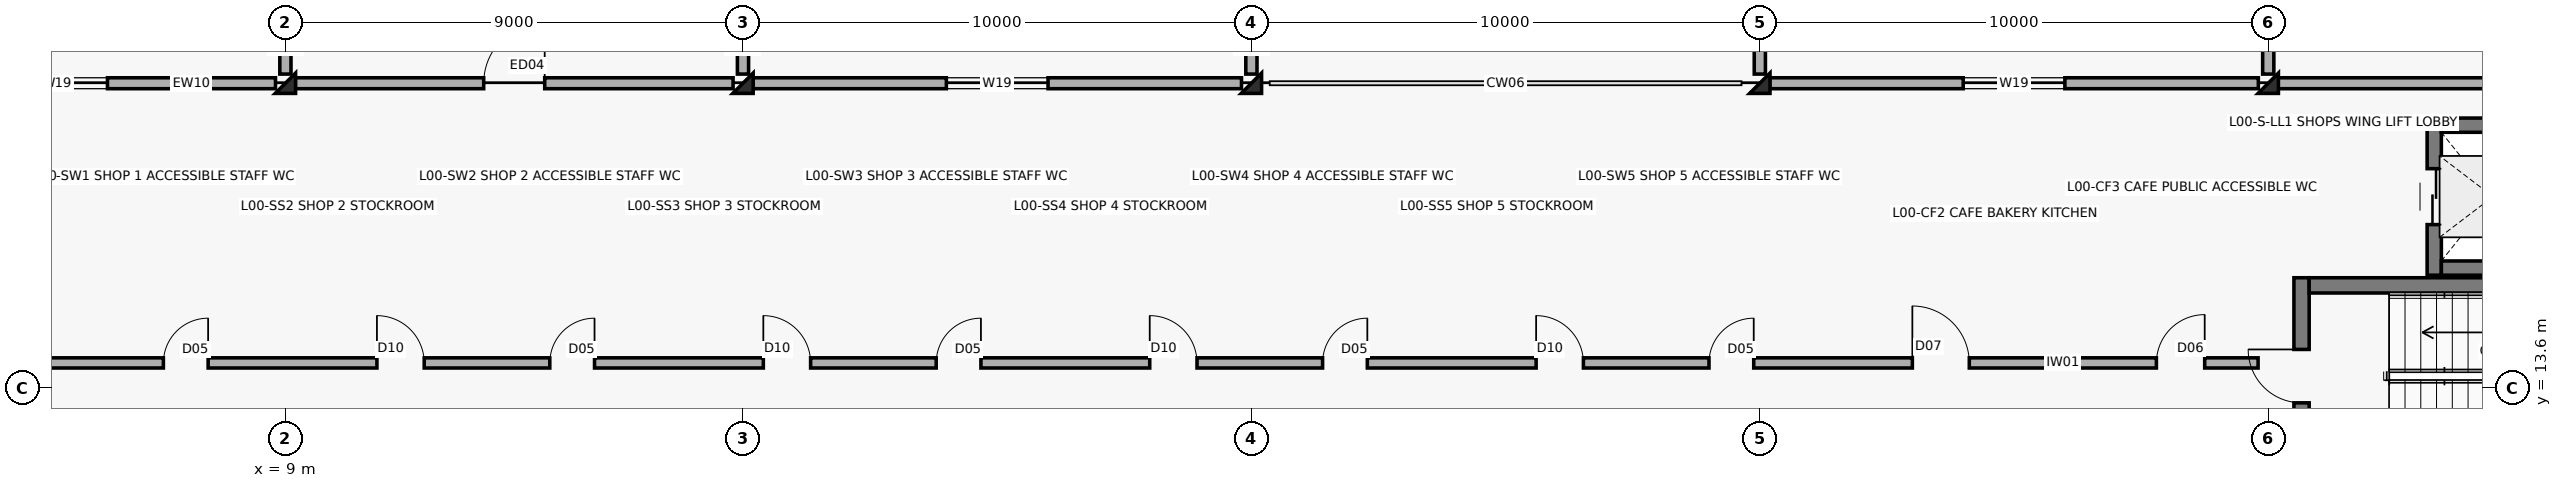
"""IFC4 building model, lengths in metres.
Left out: names, types, materials, properties, quantities, classifications, styles, units other than length and angle.
Written with IfcOpenShell. Run it as: python <this file> out.ifc"""

import sys

from ifc_helpers import new_model, si_unit, direction, frame, frame_2d, origin, origin_2d, place, context, subcontext, project, spatial, rectangle, extrude, element, fill, save


model = new_model("IFC4")
c1 = context("Model", 3, precision=1e-05, world=origin(), true_north=direction((0.0, 1.0)))
c2 = subcontext(c1, "Body", "Model", "MODEL_VIEW")
j1 = project(units=[si_unit("LENGTHUNIT", "METRE"), si_unit("PLANEANGLEUNIT", "RADIAN")], contexts=[c1])
p1 = place(None, origin())
s1 = spatial("IfcSite", under=j1, at=p1, CompositionType="ELEMENT")
p2 = place(p1, origin())
s2 = spatial("IfcBuilding", under=s1, at=p2, CompositionType="ELEMENT")
p3 = place(p2, origin())
s3 = spatial("IfcBuildingStorey", under=s2, at=p3, CompositionType="ELEMENT", Elevation=0.0)
for number, where, z_axis, x_axis in (
    (1, (9.0, 19.6, 0.0), (0.0, 0.0, 1.0), (1.0, 0.0, 0.0)),
    (2, (18.0, 19.6, 0.0), (0.0, 0.0, 1.0), (1.0, 0.0, 0.0)),
    (3, (28.0, 19.6, 0.0), (0.0, 0.0, 1.0), (1.0, 0.0, 0.0)),
    (4, (38.0, 19.6, 0.0), (0.0, 0.0, 1.0), (1.0, 0.0, 0.0)),
    (5, (48.0, 19.6, 0.0), (0.0, 0.0, 1.0), (1.0, 0.0, 0.0)),
):
    element("IfcColumn", number, at=place(p3, frame(where, z_axis=z_axis, x_axis=x_axis)), inside=s3, PredefinedType="COLUMN", context=c2, shape_type="SweptSolid", body=[
        extrude(rectangle(XDim=0.4, YDim=0.4, at=origin_2d()), origin(), (0.0, 0.0, 1.0), 4.5),
    ])
p4 = place(p3, frame((0.195, 19.6, 0.0), z_axis=(0.0, 0.0, 1.0), x_axis=(1.0, 0.0, 0.0)))
e6 = element("IfcWall", 6, at=p4, inside=s3, PredefinedType="SOLIDWALL", context=c2, shape_type="SweptSolid", body=[
    extrude(rectangle(XDim=8.61, YDim=0.215, at=frame_2d((4.305, 0.0))), origin(), (0.0, 0.0, 1.0), 3.5),
])
p5 = place(p4, frame((3.305, 0.0, 0.45)))
e7 = element("IfcOpeningElement", 7, at=p5, cuts=e6, PredefinedType="OPENING", context=c2, shape_type="SweptSolid", body=[
    extrude(rectangle(XDim=2.0, YDim=2.2, at=frame_2d((1.0, 1.1))), frame((0.0, 0.117, 0.0), z_axis=(0.0, -1.0, 0.0), x_axis=(1.0, 0.0, 0.0)), (0.0, 0.0, 1.0), 0.235),
])
p6 = place(p3, frame((9.195, 19.6, 0.0), z_axis=(0.0, 0.0, 1.0), x_axis=(1.0, 0.0, 0.0)))
e8 = element("IfcWall", 8, at=p6, inside=s3, PredefinedType="SOLIDWALL", context=c2, shape_type="SweptSolid", body=[
    extrude(rectangle(XDim=8.61, YDim=0.215, at=frame_2d((4.305, 0.0))), origin(), (0.0, 0.0, 1.0), 3.5),
])
p7 = place(p6, frame((3.705, 0.0, 0.0)))
e9 = element("IfcOpeningElement", 9, at=p7, cuts=e8, PredefinedType="OPENING", context=c2, shape_type="SweptSolid", body=[
    extrude(rectangle(XDim=1.2, YDim=2.25, at=frame_2d((0.6, 1.125))), frame((0.0, 0.117, 0.0), z_axis=(0.0, -1.0, 0.0), x_axis=(1.0, 0.0, 0.0)), (0.0, 0.0, 1.0), 0.235),
])
p8 = place(p3, frame((18.195, 19.6, 0.0), z_axis=(0.0, 0.0, 1.0), x_axis=(1.0, 0.0, 0.0)))
e10 = element("IfcWall", 10, at=p8, inside=s3, PredefinedType="SOLIDWALL", context=c2, shape_type="SweptSolid", body=[
    extrude(rectangle(XDim=9.61, YDim=0.215, at=frame_2d((4.805, 0.0))), origin(), (0.0, 0.0, 1.0), 3.5),
])
p9 = place(p8, frame((3.805, 0.0, 0.45)))
e11 = element("IfcOpeningElement", 11, at=p9, cuts=e10, PredefinedType="OPENING", context=c2, shape_type="SweptSolid", body=[
    extrude(rectangle(XDim=2.0, YDim=2.2, at=frame_2d((1.0, 1.1))), frame((0.0, 0.117, 0.0), z_axis=(0.0, -1.0, 0.0), x_axis=(1.0, 0.0, 0.0)), (0.0, 0.0, 1.0), 0.235),
])
p10 = place(p3, frame((38.195, 19.6, 0.0), z_axis=(0.0, 0.0, 1.0), x_axis=(1.0, 0.0, 0.0)))
e12 = element("IfcWall", 12, at=p10, inside=s3, PredefinedType="SOLIDWALL", context=c2, shape_type="SweptSolid", body=[
    extrude(rectangle(XDim=9.61, YDim=0.215, at=frame_2d((4.805, 0.0))), origin(), (0.0, 0.0, 1.0), 3.5),
])
p11 = place(p10, frame((3.805, 0.0, 0.45)))
e13 = element("IfcOpeningElement", 13, at=p11, cuts=e12, PredefinedType="OPENING", context=c2, shape_type="SweptSolid", body=[
    extrude(rectangle(XDim=2.0, YDim=2.2, at=frame_2d((1.0, 1.1))), frame((0.0, 0.117, 0.0), z_axis=(0.0, -1.0, 0.0), x_axis=(1.0, 0.0, 0.0)), (0.0, 0.0, 1.0), 0.235),
])
p12 = place(p3, frame((48.195, 19.6, 0.0), z_axis=(0.0, 0.0, 1.0), x_axis=(1.0, 0.0, 0.0)))
e14 = element("IfcWall", 14, at=p12, inside=s3, PredefinedType="SOLIDWALL", context=c2, shape_type="SweptSolid", body=[
    extrude(rectangle(XDim=9.61, YDim=0.215, at=frame_2d((4.805, 0.0))), origin(), (0.0, 0.0, 1.0), 3.5),
])
p13 = place(p12, frame((4.205, 0.0, 0.0)))
e15 = element("IfcOpeningElement", 15, at=p13, cuts=e14, PredefinedType="OPENING", context=c2, shape_type="SweptSolid", body=[
    extrude(rectangle(XDim=1.2, YDim=2.25, at=frame_2d((0.6, 1.125))), frame((0.0, 0.117, 0.0), z_axis=(0.0, -1.0, 0.0), x_axis=(1.0, 0.0, 0.0)), (0.0, 0.0, 1.0), 0.235),
])
for number, where, z_axis, x_axis in (
    (16, (9.0, 19.78, 0.0), (0.0, 0.0, 1.0), (0.0, 1.0, 0.0)),
    (17, (18.0, 19.78, 0.0), (0.0, 0.0, 1.0), (0.0, 1.0, 0.0)),
    (18, (28.0, 19.78, 0.0), (0.0, 0.0, 1.0), (0.0, 1.0, 0.0)),
    (19, (38.0, 19.78, 0.0), (0.0, 0.0, 1.0), (0.0, 1.0, 0.0)),
    (20, (48.0, 19.78, 0.0), (0.0, 0.0, 1.0), (0.0, 1.0, 0.0)),
):
    element("IfcWall", number, at=place(p3, frame(where, z_axis=z_axis, x_axis=x_axis)), inside=s3, PredefinedType="PARAPET", context=c2, shape_type="SweptSolid", body=[
        extrude(rectangle(XDim=0.87, YDim=0.22, at=frame_2d((0.435, 0.0))), origin(), (0.0, 0.0, 1.0), 4.5),
    ])
p14 = place(p3, frame((48.655, 11.905, 0.0), z_axis=(0.0, 0.0, 1.0), x_axis=(0.0, 1.0, 0.0)))
e21 = element("IfcWall", 21, at=p14, inside=s3, PredefinedType="SHEAR", context=c2, shape_type="SweptSolid", body=[
    extrude(rectangle(XDim=3.87, YDim=0.3, at=frame_2d((1.935, 0.0))), origin(), (0.0, 0.0, 1.0), 4.5),
])
p15 = place(p14, frame((1.41, 0.0, 0.0)))
e22 = element("IfcOpeningElement", 22, at=p15, cuts=e21, PredefinedType="OPENING", context=c2, shape_type="SweptSolid", body=[
    extrude(rectangle(XDim=1.05, YDim=2.15, at=frame_2d((0.525, 1.075))), frame((0.0, 0.16, 0.0), z_axis=(0.0, -1.0, 0.0), x_axis=(1.0, 0.0, 0.0)), (0.0, 0.0, 1.0), 0.32),
])
p16 = place(p3, frame((48.805, 15.625, 0.0), z_axis=(0.0, 0.0, 1.0), x_axis=(1.0, 0.0, 0.0)))
e23 = element("IfcWall", 23, at=p16, inside=s3, PredefinedType="SHEAR", context=c2, shape_type="SweptSolid", body=[
    extrude(rectangle(XDim=7.69, YDim=0.3, at=frame_2d((3.845, 0.0))), origin(), (0.0, 0.0, 1.0), 4.5),
])
p17 = place(p3, frame((51.265, 15.825, 0.0), z_axis=(0.0, 0.0, 1.0), x_axis=(0.0, 1.0, 0.0)))
e24 = element("IfcWall", 24, at=p17, inside=s3, PredefinedType="SHEAR", context=c2, shape_type="SweptSolid", body=[
    extrude(rectangle(XDim=3.09, YDim=0.28, at=frame_2d((1.545, 0.0))), origin(), (0.0, 0.0, 1.0), 4.5),
])
p18 = place(p17, frame((0.995, 0.0, 0.0)))
e25 = element("IfcOpeningElement", 25, at=p18, cuts=e24, PredefinedType="OPENING", context=c2, shape_type="SweptSolid", body=[
    extrude(rectangle(XDim=1.1, YDim=2.15, at=frame_2d((0.55, 1.075))), frame((0.0, 0.15, 0.0), z_axis=(0.0, -1.0, 0.0), x_axis=(1.0, 0.0, 0.0)), (0.0, 0.0, 1.0), 0.3),
])
for number, where, z_axis, x_axis in (
    (26, (51.405, 15.965, 0.0), (0.0, 0.0, 1.0), (1.0, 0.0, 0.0)),
    (27, (51.405, 18.775, 0.0), (0.0, 0.0, 1.0), (1.0, 0.0, 0.0)),
):
    element("IfcWall", number, at=place(p3, frame(where, z_axis=z_axis, x_axis=x_axis)), inside=s3, PredefinedType="SHEAR", context=c2, shape_type="SweptSolid", body=[
        extrude(rectangle(XDim=2.03, YDim=0.28, at=frame_2d((1.015, 0.0))), origin(), (0.0, 0.0, 1.0), 4.5),
    ])
p19 = place(p3, frame((1.0, 14.1, 0.0), z_axis=(0.0, 0.0, 1.0), x_axis=(1.0, 0.0, 0.0)))
e28 = element("IfcWall", 28, at=p19, inside=s3, PredefinedType="SOLIDWALL", context=c2, shape_type="SweptSolid", body=[
    extrude(rectangle(XDim=46.8, YDim=0.2, at=frame_2d((23.4, 0.0))), origin(), (0.0, 0.0, 1.0), 3.6),
])
p20 = place(p19, frame((2.2, 0.0, 0.0)))
e29 = element("IfcOpeningElement", 29, at=p20, cuts=e28, PredefinedType="OPENING", context=c2, shape_type="SweptSolid", body=[
    extrude(rectangle(XDim=0.93, YDim=2.1, at=frame_2d((0.465, 1.05))), frame((0.0, 0.11, 0.0), z_axis=(0.0, -1.0, 0.0), x_axis=(1.0, 0.0, 0.0)), (0.0, 0.0, 1.0), 0.22),
])
p21 = place(p19, frame((5.6, 0.0, 0.0)))
e30 = element("IfcOpeningElement", 30, at=p21, cuts=e28, PredefinedType="OPENING", context=c2, shape_type="SweptSolid", body=[
    extrude(rectangle(XDim=0.88, YDim=2.1, at=frame_2d((0.44, 1.05))), frame((0.0, 0.11, 0.0), z_axis=(0.0, -1.0, 0.0), x_axis=(1.0, 0.0, 0.0)), (0.0, 0.0, 1.0), 0.22),
])
p22 = place(p19, frame((9.8, 0.0, 0.0)))
e31 = element("IfcOpeningElement", 31, at=p22, cuts=e28, PredefinedType="OPENING", context=c2, shape_type="SweptSolid", body=[
    extrude(rectangle(XDim=0.93, YDim=2.1, at=frame_2d((0.465, 1.05))), frame((0.0, 0.11, 0.0), z_axis=(0.0, -1.0, 0.0), x_axis=(1.0, 0.0, 0.0)), (0.0, 0.0, 1.0), 0.22),
])
p23 = place(p19, frame((13.2, 0.0, 0.0)))
e32 = element("IfcOpeningElement", 32, at=p23, cuts=e28, PredefinedType="OPENING", context=c2, shape_type="SweptSolid", body=[
    extrude(rectangle(XDim=0.88, YDim=2.1, at=frame_2d((0.44, 1.05))), frame((0.0, 0.11, 0.0), z_axis=(0.0, -1.0, 0.0), x_axis=(1.0, 0.0, 0.0)), (0.0, 0.0, 1.0), 0.22),
])
p24 = place(p19, frame((17.4, 0.0, 0.0)))
e33 = element("IfcOpeningElement", 33, at=p24, cuts=e28, PredefinedType="OPENING", context=c2, shape_type="SweptSolid", body=[
    extrude(rectangle(XDim=0.93, YDim=2.1, at=frame_2d((0.465, 1.05))), frame((0.0, 0.11, 0.0), z_axis=(0.0, -1.0, 0.0), x_axis=(1.0, 0.0, 0.0)), (0.0, 0.0, 1.0), 0.22),
])
p25 = place(p19, frame((20.8, 0.0, 0.0)))
e34 = element("IfcOpeningElement", 34, at=p25, cuts=e28, PredefinedType="OPENING", context=c2, shape_type="SweptSolid", body=[
    extrude(rectangle(XDim=0.88, YDim=2.1, at=frame_2d((0.44, 1.05))), frame((0.0, 0.11, 0.0), z_axis=(0.0, -1.0, 0.0), x_axis=(1.0, 0.0, 0.0)), (0.0, 0.0, 1.0), 0.22),
])
p26 = place(p19, frame((25.0, 0.0, 0.0)))
e35 = element("IfcOpeningElement", 35, at=p26, cuts=e28, PredefinedType="OPENING", context=c2, shape_type="SweptSolid", body=[
    extrude(rectangle(XDim=0.93, YDim=2.1, at=frame_2d((0.465, 1.05))), frame((0.0, 0.11, 0.0), z_axis=(0.0, -1.0, 0.0), x_axis=(1.0, 0.0, 0.0)), (0.0, 0.0, 1.0), 0.22),
])
p27 = place(p19, frame((28.4, 0.0, 0.0)))
e36 = element("IfcOpeningElement", 36, at=p27, cuts=e28, PredefinedType="OPENING", context=c2, shape_type="SweptSolid", body=[
    extrude(rectangle(XDim=0.88, YDim=2.1, at=frame_2d((0.44, 1.05))), frame((0.0, 0.11, 0.0), z_axis=(0.0, -1.0, 0.0), x_axis=(1.0, 0.0, 0.0)), (0.0, 0.0, 1.0), 0.22),
])
p28 = place(p19, frame((32.6, 0.0, 0.0)))
e37 = element("IfcOpeningElement", 37, at=p28, cuts=e28, PredefinedType="OPENING", context=c2, shape_type="SweptSolid", body=[
    extrude(rectangle(XDim=0.93, YDim=2.1, at=frame_2d((0.465, 1.05))), frame((0.0, 0.11, 0.0), z_axis=(0.0, -1.0, 0.0), x_axis=(1.0, 0.0, 0.0)), (0.0, 0.0, 1.0), 0.22),
])
p29 = place(p19, frame((36.0, 0.0, 0.0)))
e38 = element("IfcOpeningElement", 38, at=p29, cuts=e28, PredefinedType="OPENING", context=c2, shape_type="SweptSolid", body=[
    extrude(rectangle(XDim=0.88, YDim=2.1, at=frame_2d((0.44, 1.05))), frame((0.0, 0.11, 0.0), z_axis=(0.0, -1.0, 0.0), x_axis=(1.0, 0.0, 0.0)), (0.0, 0.0, 1.0), 0.22),
])
p30 = place(p19, frame((40.0, 0.0, 0.0)))
e39 = element("IfcOpeningElement", 39, at=p30, cuts=e28, PredefinedType="OPENING", context=c2, shape_type="SweptSolid", body=[
    extrude(rectangle(XDim=1.12, YDim=2.15, at=frame_2d((0.56, 1.075))), frame((0.0, 0.11, 0.0), z_axis=(0.0, -1.0, 0.0), x_axis=(1.0, 0.0, 0.0)), (0.0, 0.0, 1.0), 0.22),
])
p31 = place(p19, frame((44.8, 0.0, 0.0)))
e40 = element("IfcOpeningElement", 40, at=p31, cuts=e28, PredefinedType="OPENING", context=c2, shape_type="SweptSolid", body=[
    extrude(rectangle(XDim=0.95, YDim=2.1, at=frame_2d((0.475, 1.05))), frame((0.0, 0.11, 0.0), z_axis=(0.0, -1.0, 0.0), x_axis=(1.0, 0.0, 0.0)), (0.0, 0.0, 1.0), 0.22),
])
p32 = place(p5, origin())
e41 = element("IfcWindow", 41, at=p32, inside=s3, PartitioningType="DOUBLE_PANEL_VERTICAL", PredefinedType="WINDOW", context=c2, shape_type="SweptSolid", body=[
    extrude(rectangle(XDim=2.0, YDim=2.2, at=frame_2d((1.0, 1.1))), frame((0.0, 0.03, 0.0), z_axis=(0.0, -1.0, 0.0), x_axis=(1.0, 0.0, 0.0)), (0.0, 0.0, 1.0), 0.06),
])
fill(e7, e41)
p33 = place(p7, origin())
e42 = element("IfcDoor", 42, at=p33, inside=s3, OperationType="SINGLE_SWING_RIGHT", PredefinedType="DOOR", context=c2, shape_type="SweptSolid", body=[
    extrude(rectangle(XDim=1.2, YDim=2.25, at=frame_2d((0.6, 1.125))), frame((0.0, 0.025, 0.0), z_axis=(0.0, -1.0, 0.0), x_axis=(1.0, 0.0, 0.0)), (0.0, 0.0, 1.0), 0.05),
])
fill(e9, e42)
p34 = place(p9, origin())
e43 = element("IfcWindow", 43, at=p34, inside=s3, PartitioningType="DOUBLE_PANEL_VERTICAL", PredefinedType="WINDOW", context=c2, shape_type="SweptSolid", body=[
    extrude(rectangle(XDim=2.0, YDim=2.2, at=frame_2d((1.0, 1.1))), frame((0.0, 0.03, 0.0), z_axis=(0.0, -1.0, 0.0), x_axis=(1.0, 0.0, 0.0)), (0.0, 0.0, 1.0), 0.06),
])
fill(e11, e43)
p35 = place(p11, origin())
e44 = element("IfcWindow", 44, at=p35, inside=s3, PartitioningType="DOUBLE_PANEL_VERTICAL", PredefinedType="WINDOW", context=c2, shape_type="SweptSolid", body=[
    extrude(rectangle(XDim=2.0, YDim=2.2, at=frame_2d((1.0, 1.1))), frame((0.0, 0.03, 0.0), z_axis=(0.0, -1.0, 0.0), x_axis=(1.0, 0.0, 0.0)), (0.0, 0.0, 1.0), 0.06),
])
fill(e13, e44)
p36 = place(p15, origin())
e45 = element("IfcDoor", 45, at=p36, inside=s3, OperationType="SINGLE_SWING_RIGHT", PredefinedType="DOOR", context=c2, shape_type="SweptSolid", body=[
    extrude(rectangle(XDim=1.05, YDim=2.15, at=frame_2d((0.525, 1.075))), frame((0.0, 0.025, 0.0), z_axis=(0.0, -1.0, 0.0), x_axis=(1.0, 0.0, 0.0)), (0.0, 0.0, 1.0), 0.05),
])
fill(e22, e45)
p37 = place(p18, origin())
e46 = element("IfcDoor", 46, at=p37, inside=s3, OperationType="DOUBLE_DOOR_SLIDING", PredefinedType="DOOR", context=c2, shape_type="SweptSolid", body=[
    extrude(rectangle(XDim=1.1, YDim=2.15, at=frame_2d((0.55, 1.075))), frame((0.0, 0.025, 0.0), z_axis=(0.0, -1.0, 0.0), x_axis=(1.0, 0.0, 0.0)), (0.0, 0.0, 1.0), 0.05),
])
fill(e25, e46)
p38 = place(p21, origin())
e47 = element("IfcDoor", 47, at=p38, inside=s3, OperationType="SINGLE_SWING_RIGHT", PredefinedType="DOOR", context=c2, shape_type="SweptSolid", body=[
    extrude(rectangle(XDim=0.88, YDim=2.1, at=frame_2d((0.44, 1.05))), frame((0.0, 0.025, 0.0), z_axis=(0.0, -1.0, 0.0), x_axis=(1.0, 0.0, 0.0)), (0.0, 0.0, 1.0), 0.05),
])
fill(e30, e47)
p39 = place(p22, origin())
e48 = element("IfcDoor", 48, at=p39, inside=s3, OperationType="SINGLE_SWING_LEFT", PredefinedType="DOOR", context=c2, shape_type="SweptSolid", body=[
    extrude(rectangle(XDim=0.93, YDim=2.1, at=frame_2d((0.465, 1.05))), frame((0.0, 0.025, 0.0), z_axis=(0.0, -1.0, 0.0), x_axis=(1.0, 0.0, 0.0)), (0.0, 0.0, 1.0), 0.05),
])
fill(e31, e48)
p40 = place(p23, origin())
e49 = element("IfcDoor", 49, at=p40, inside=s3, OperationType="SINGLE_SWING_RIGHT", PredefinedType="DOOR", context=c2, shape_type="SweptSolid", body=[
    extrude(rectangle(XDim=0.88, YDim=2.1, at=frame_2d((0.44, 1.05))), frame((0.0, 0.025, 0.0), z_axis=(0.0, -1.0, 0.0), x_axis=(1.0, 0.0, 0.0)), (0.0, 0.0, 1.0), 0.05),
])
fill(e32, e49)
p41 = place(p24, origin())
e50 = element("IfcDoor", 50, at=p41, inside=s3, OperationType="SINGLE_SWING_LEFT", PredefinedType="DOOR", context=c2, shape_type="SweptSolid", body=[
    extrude(rectangle(XDim=0.93, YDim=2.1, at=frame_2d((0.465, 1.05))), frame((0.0, 0.025, 0.0), z_axis=(0.0, -1.0, 0.0), x_axis=(1.0, 0.0, 0.0)), (0.0, 0.0, 1.0), 0.05),
])
fill(e33, e50)
p42 = place(p25, origin())
e51 = element("IfcDoor", 51, at=p42, inside=s3, OperationType="SINGLE_SWING_RIGHT", PredefinedType="DOOR", context=c2, shape_type="SweptSolid", body=[
    extrude(rectangle(XDim=0.88, YDim=2.1, at=frame_2d((0.44, 1.05))), frame((0.0, 0.025, 0.0), z_axis=(0.0, -1.0, 0.0), x_axis=(1.0, 0.0, 0.0)), (0.0, 0.0, 1.0), 0.05),
])
fill(e34, e51)
p43 = place(p26, origin())
e52 = element("IfcDoor", 52, at=p43, inside=s3, OperationType="SINGLE_SWING_LEFT", PredefinedType="DOOR", context=c2, shape_type="SweptSolid", body=[
    extrude(rectangle(XDim=0.93, YDim=2.1, at=frame_2d((0.465, 1.05))), frame((0.0, 0.025, 0.0), z_axis=(0.0, -1.0, 0.0), x_axis=(1.0, 0.0, 0.0)), (0.0, 0.0, 1.0), 0.05),
])
fill(e35, e52)
p44 = place(p27, origin())
e53 = element("IfcDoor", 53, at=p44, inside=s3, OperationType="SINGLE_SWING_RIGHT", PredefinedType="DOOR", context=c2, shape_type="SweptSolid", body=[
    extrude(rectangle(XDim=0.88, YDim=2.1, at=frame_2d((0.44, 1.05))), frame((0.0, 0.025, 0.0), z_axis=(0.0, -1.0, 0.0), x_axis=(1.0, 0.0, 0.0)), (0.0, 0.0, 1.0), 0.05),
])
fill(e36, e53)
p45 = place(p28, origin())
e54 = element("IfcDoor", 54, at=p45, inside=s3, OperationType="SINGLE_SWING_LEFT", PredefinedType="DOOR", context=c2, shape_type="SweptSolid", body=[
    extrude(rectangle(XDim=0.93, YDim=2.1, at=frame_2d((0.465, 1.05))), frame((0.0, 0.025, 0.0), z_axis=(0.0, -1.0, 0.0), x_axis=(1.0, 0.0, 0.0)), (0.0, 0.0, 1.0), 0.05),
])
fill(e37, e54)
p46 = place(p29, origin())
e55 = element("IfcDoor", 55, at=p46, inside=s3, OperationType="SINGLE_SWING_RIGHT", PredefinedType="DOOR", context=c2, shape_type="SweptSolid", body=[
    extrude(rectangle(XDim=0.88, YDim=2.1, at=frame_2d((0.44, 1.05))), frame((0.0, 0.025, 0.0), z_axis=(0.0, -1.0, 0.0), x_axis=(1.0, 0.0, 0.0)), (0.0, 0.0, 1.0), 0.05),
])
fill(e38, e55)
p47 = place(p30, origin())
e56 = element("IfcDoor", 56, at=p47, inside=s3, OperationType="SINGLE_SWING_LEFT", PredefinedType="DOOR", context=c2, shape_type="SweptSolid", body=[
    extrude(rectangle(XDim=1.12, YDim=2.15, at=frame_2d((0.56, 1.075))), frame((0.0, 0.025, 0.0), z_axis=(0.0, -1.0, 0.0), x_axis=(1.0, 0.0, 0.0)), (0.0, 0.0, 1.0), 0.05),
])
fill(e39, e56)
p48 = place(p31, origin())
e57 = element("IfcDoor", 57, at=p48, inside=s3, OperationType="SINGLE_SWING_RIGHT", PredefinedType="DOOR", context=c2, shape_type="SweptSolid", body=[
    extrude(rectangle(XDim=0.95, YDim=2.1, at=frame_2d((0.475, 1.05))), frame((0.0, 0.025, 0.0), z_axis=(0.0, -1.0, 0.0), x_axis=(1.0, 0.0, 0.0)), (0.0, 0.0, 1.0), 0.05),
])
fill(e40, e57)
save(model, sys.argv[1])
